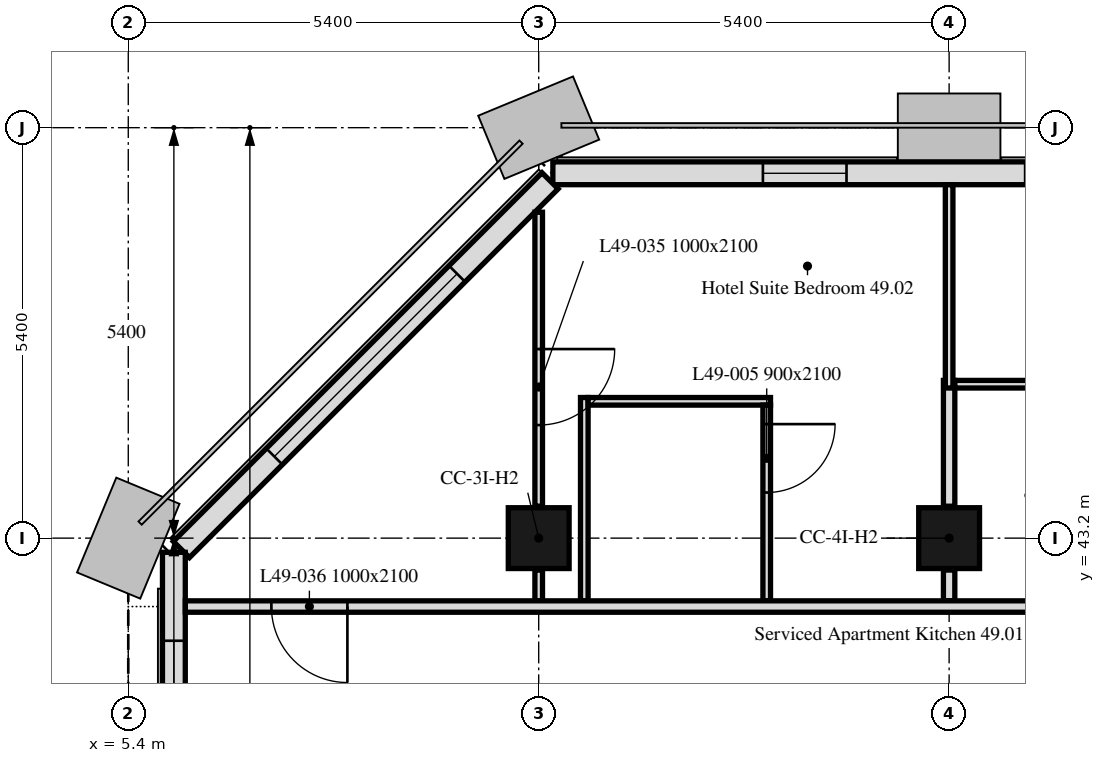
"""IFC4 building model, lengths in metres.
Left out: names, types, materials, properties, quantities, classifications, styles, units other than length and angle.
Written with IfcOpenShell. Run it as: python <this file> out.ifc"""

import sys

from ifc_helpers import new_model, si_unit, direction, frame, frame_2d, origin, origin_2d, place, context, subcontext, project, spatial, rectangle, extrude, element, fill, save


model = new_model("IFC4")
c1 = context("Model", 3, precision=1e-05, world=origin(), true_north=direction((0.0, 1.0)))
c2 = subcontext(c1, "Body", "Model", "MODEL_VIEW")
j1 = project(units=[si_unit("LENGTHUNIT", "METRE"), si_unit("PLANEANGLEUNIT", "RADIAN")], contexts=[c1])
p1 = place(None, origin())
s1 = spatial("IfcSite", under=j1, at=p1, CompositionType="ELEMENT")
p2 = place(p1, origin())
s2 = spatial("IfcBuilding", under=s1, at=p2, CompositionType="ELEMENT")
p3 = place(p2, frame((0.0, 0.0, 200.5)))
s3 = spatial("IfcBuildingStorey", under=s2, at=p3, CompositionType="ELEMENT", Elevation=200.5)
for number, where, z_axis, x_axis in (
    (1, (10.8, 43.2, 0.0), (0.0, 0.0, 1.0), (1.0, 0.0, 0.0)),
    (2, (16.2, 43.2, 0.0), (0.0, 0.0, 1.0), (1.0, 0.0, 0.0)),
):
    element("IfcColumn", number, at=place(p3, frame(where, z_axis=z_axis, x_axis=x_axis)), inside=s3, PredefinedType="COLUMN", context=c2, shape_type="SweptSolid", body=[
        extrude(rectangle(XDim=0.8, YDim=0.8, at=origin_2d()), origin(), (0.0, 0.0, 1.0), 3.0),
    ])
p4 = place(p3, frame((43.014, 48.0, 0.0), z_axis=(0.0, 0.0, 1.0), x_axis=(-1.0, 0.0, 0.0)))
e3 = element("IfcWall", 3, at=p4, inside=s3, PredefinedType="SOLIDWALL", context=c2, shape_type="SweptSolid", body=[
    extrude(rectangle(XDim=32.027, YDim=0.3, at=frame_2d((16.014, 0.0))), origin(), (0.0, 0.0, 1.0), 3.0),
])
p5 = place(p4, frame((0.814, 0.0, 0.9)))
e4 = element("IfcOpeningElement", 4, at=p5, cuts=e3, PredefinedType="OPENING", context=c2, shape_type="SweptSolid", body=[
    extrude(rectangle(XDim=3.4, YDim=1.7, at=frame_2d((1.7, 0.85))), frame((0.0, 0.16, 0.0), z_axis=(0.0, -1.0, 0.0), x_axis=(1.0, 0.0, 0.0)), (0.0, 0.0, 1.0), 0.32),
])
p6 = place(p4, frame((6.564, 0.0, 0.9)))
e5 = element("IfcOpeningElement", 5, at=p6, cuts=e3, PredefinedType="OPENING", context=c2, shape_type="SweptSolid", body=[
    extrude(rectangle(XDim=1.1, YDim=1.7, at=frame_2d((0.55, 0.85))), frame((0.0, 0.16, 0.0), z_axis=(0.0, -1.0, 0.0), x_axis=(1.0, 0.0, 0.0)), (0.0, 0.0, 1.0), 0.32),
])
p7 = place(p4, frame((11.614, 0.0, 0.9)))
e6 = element("IfcOpeningElement", 6, at=p7, cuts=e3, PredefinedType="OPENING", context=c2, shape_type="SweptSolid", body=[
    extrude(rectangle(XDim=3.4, YDim=1.7, at=frame_2d((1.7, 0.85))), frame((0.0, 0.16, 0.0), z_axis=(0.0, -1.0, 0.0), x_axis=(1.0, 0.0, 0.0)), (0.0, 0.0, 1.0), 0.32),
])
p8 = place(p4, frame((17.364, 0.0, 0.9)))
e7 = element("IfcOpeningElement", 7, at=p8, cuts=e3, PredefinedType="OPENING", context=c2, shape_type="SweptSolid", body=[
    extrude(rectangle(XDim=1.1, YDim=1.7, at=frame_2d((0.55, 0.85))), frame((0.0, 0.16, 0.0), z_axis=(0.0, -1.0, 0.0), x_axis=(1.0, 0.0, 0.0)), (0.0, 0.0, 1.0), 0.32),
])
p9 = place(p4, frame((22.414, 0.0, 0.9)))
e8 = element("IfcOpeningElement", 8, at=p9, cuts=e3, PredefinedType="OPENING", context=c2, shape_type="SweptSolid", body=[
    extrude(rectangle(XDim=3.4, YDim=1.7, at=frame_2d((1.7, 0.85))), frame((0.0, 0.16, 0.0), z_axis=(0.0, -1.0, 0.0), x_axis=(1.0, 0.0, 0.0)), (0.0, 0.0, 1.0), 0.32),
])
p10 = place(p4, frame((28.164, 0.0, 0.9)))
e9 = element("IfcOpeningElement", 9, at=p10, cuts=e3, PredefinedType="OPENING", context=c2, shape_type="SweptSolid", body=[
    extrude(rectangle(XDim=1.1, YDim=1.7, at=frame_2d((0.55, 0.85))), frame((0.0, 0.16, 0.0), z_axis=(0.0, -1.0, 0.0), x_axis=(1.0, 0.0, 0.0)), (0.0, 0.0, 1.0), 0.32),
])
p11 = place(p3, frame((10.949, 47.901, 0.0), z_axis=(0.0, 0.0, 1.0), x_axis=(-0.707106781187, -0.707106781187, 0.0)))
e10 = element("IfcWall", 10, at=p11, inside=s3, PredefinedType="SOLIDWALL", context=c2, shape_type="SweptSolid", body=[
    extrude(rectangle(XDim=6.86, YDim=0.3, at=frame_2d((3.43, 0.0))), origin(), (0.0, 0.0, 1.0), 3.0),
])
p12 = place(p11, frame((1.73, 0.0, 0.9)))
e11 = element("IfcOpeningElement", 11, at=p12, cuts=e10, PredefinedType="OPENING", context=c2, shape_type="SweptSolid", body=[
    extrude(rectangle(XDim=3.4, YDim=1.7, at=frame_2d((1.7, 0.85))), frame((0.0, 0.16, 0.0), z_axis=(0.0, -1.0, 0.0), x_axis=(1.0, 0.0, 0.0)), (0.0, 0.0, 1.0), 0.32),
])
p13 = place(p3, frame((6.0, 43.014, 0.0), z_axis=(0.0, 0.0, 1.0), x_axis=(0.0, -1.0, 0.0)))
e12 = element("IfcWall", 12, at=p13, inside=s3, PredefinedType="SOLIDWALL", context=c2, shape_type="SweptSolid", body=[
    extrude(rectangle(XDim=10.614, YDim=0.3, at=frame_2d((5.307, 0.0))), origin(), (0.0, 0.0, 1.0), 3.0),
])
p14 = place(p13, frame((1.164, 0.0, 0.9)))
e13 = element("IfcOpeningElement", 13, at=p14, cuts=e12, PredefinedType="OPENING", context=c2, shape_type="SweptSolid", body=[
    extrude(rectangle(XDim=1.1, YDim=1.7, at=frame_2d((0.55, 0.85))), frame((0.0, 0.16, 0.0), z_axis=(0.0, -1.0, 0.0), x_axis=(1.0, 0.0, 0.0)), (0.0, 0.0, 1.0), 0.32),
])
p15 = place(p13, frame((2.764, 0.0, 0.9)))
e14 = element("IfcOpeningElement", 14, at=p15, cuts=e12, PredefinedType="OPENING", context=c2, shape_type="SweptSolid", body=[
    extrude(rectangle(XDim=1.1, YDim=1.7, at=frame_2d((0.55, 0.85))), frame((0.0, 0.16, 0.0), z_axis=(0.0, -1.0, 0.0), x_axis=(1.0, 0.0, 0.0)), (0.0, 0.0, 1.0), 0.32),
])
p16 = place(p13, frame((6.564, 0.0, 0.9)))
e15 = element("IfcOpeningElement", 15, at=p16, cuts=e12, PredefinedType="OPENING", context=c2, shape_type="SweptSolid", body=[
    extrude(rectangle(XDim=1.1, YDim=1.7, at=frame_2d((0.55, 0.85))), frame((0.0, 0.16, 0.0), z_axis=(0.0, -1.0, 0.0), x_axis=(1.0, 0.0, 0.0)), (0.0, 0.0, 1.0), 0.32),
])
p17 = place(p13, frame((8.164, 0.0, 0.9)))
e16 = element("IfcOpeningElement", 16, at=p17, cuts=e12, PredefinedType="OPENING", context=c2, shape_type="SweptSolid", body=[
    extrude(rectangle(XDim=1.1, YDim=1.7, at=frame_2d((0.55, 0.85))), frame((0.0, 0.16, 0.0), z_axis=(0.0, -1.0, 0.0), x_axis=(1.0, 0.0, 0.0)), (0.0, 0.0, 1.0), 0.32),
])
p18 = place(p3, frame((10.8, 47.488, 0.0), z_axis=(0.0, 0.0, 1.0), x_axis=(0.0, -1.0, 0.0)))
e17 = element("IfcWall", 17, at=p18, inside=s3, PredefinedType="PARTITIONING", context=c2, shape_type="SweptSolid", body=[
    extrude(rectangle(XDim=3.868, YDim=0.1, at=frame_2d((1.934, 0.0))), origin(), (0.0, 0.0, 1.0), 3.0),
])
p19 = place(p18, frame((1.8, 0.0, 0.0)))
e18 = element("IfcOpeningElement", 18, at=p19, cuts=e17, PredefinedType="OPENING", context=c2, shape_type="SweptSolid", body=[
    extrude(rectangle(XDim=1.0, YDim=2.1, at=frame_2d((0.5, 1.05))), frame((0.0, 0.05, 0.0), z_axis=(0.0, -1.0, 0.0), x_axis=(1.0, 0.0, 0.0)), (0.0, 0.0, 1.0), 0.1),
])
p20 = place(p3, frame((10.8, 42.78, 0.0), z_axis=(0.0, 0.0, 1.0), x_axis=(0.0, -1.0, 0.0)))
e19 = element("IfcWall", 19, at=p20, inside=s3, PredefinedType="PARTITIONING", context=c2, shape_type="SweptSolid", body=[
    extrude(rectangle(XDim=0.405, YDim=0.1, at=frame_2d((0.203, 0.0))), origin(), (0.0, 0.0, 1.0), 3.0),
])
p21 = place(p3, frame((11.4, 42.375, 0.0), z_axis=(0.0, 0.0, 1.0), x_axis=(0.0, 1.0, 0.0)))
e20 = element("IfcWall", 20, at=p21, inside=s3, PredefinedType="PARTITIONING", context=c2, shape_type="SweptSolid", body=[
    extrude(rectangle(XDim=2.675, YDim=0.1, at=frame_2d((1.337, 0.0))), origin(), (0.0, 0.0, 1.0), 3.0),
])
p22 = place(p3, frame((11.45, 45.0, 0.0), z_axis=(0.0, 0.0, 1.0), x_axis=(1.0, 0.0, 0.0)))
e21 = element("IfcWall", 21, at=p22, inside=s3, PredefinedType="PARTITIONING", context=c2, shape_type="SweptSolid", body=[
    extrude(rectangle(XDim=2.4, YDim=0.1, at=frame_2d((1.2, 0.0))), origin(), (0.0, 0.0, 1.0), 3.0),
])
p23 = place(p3, frame((13.8, 44.95, 0.0), z_axis=(0.0, 0.0, 1.0), x_axis=(0.0, -1.0, 0.0)))
e22 = element("IfcWall", 22, at=p23, inside=s3, PredefinedType="PARTITIONING", context=c2, shape_type="SweptSolid", body=[
    extrude(rectangle(XDim=2.575, YDim=0.1, at=frame_2d((1.288, 0.0))), origin(), (0.0, 0.0, 1.0), 3.0),
])
p24 = place(p23, frame((0.25, 0.0, 0.0)))
e23 = element("IfcOpeningElement", 23, at=p24, cuts=e22, PredefinedType="OPENING", context=c2, shape_type="SweptSolid", body=[
    extrude(rectangle(XDim=0.9, YDim=2.1, at=frame_2d((0.45, 1.05))), frame((0.0, 0.05, 0.0), z_axis=(0.0, -1.0, 0.0), x_axis=(1.0, 0.0, 0.0)), (0.0, 0.0, 1.0), 0.1),
])
p25 = place(p3, frame((16.2, 42.375, 0.0), z_axis=(0.0, 0.0, 1.0), x_axis=(0.0, 1.0, 0.0)))
e24 = element("IfcWall", 24, at=p25, inside=s3, PredefinedType="PARTITIONING", context=c2, shape_type="SweptSolid", body=[
    extrude(rectangle(XDim=0.405, YDim=0.15, at=frame_2d((0.203, 0.0))), origin(), (0.0, 0.0, 1.0), 2.4),
])
p26 = place(p3, frame((16.2, 43.62, 0.0), z_axis=(0.0, 0.0, 1.0), x_axis=(0.0, 1.0, 0.0)))
e25 = element("IfcWall", 25, at=p26, inside=s3, PredefinedType="PARTITIONING", context=c2, shape_type="SweptSolid", body=[
    extrude(rectangle(XDim=1.655, YDim=0.15, at=frame_2d((0.827, 0.0))), origin(), (0.0, 0.0, 1.0), 2.4),
])
p27 = place(p3, frame((16.2, 45.175, 0.0), z_axis=(0.0, 0.0, 1.0), x_axis=(0.0, 1.0, 0.0)))
e26 = element("IfcWall", 26, at=p27, inside=s3, PredefinedType="PARTITIONING", context=c2, shape_type="SweptSolid", body=[
    extrude(rectangle(XDim=2.674, YDim=0.1, at=frame_2d((1.337, 0.0))), origin(), (0.0, 0.0, 1.0), 2.4),
])
p28 = place(p3, frame((18.25, 45.225, 0.0), z_axis=(0.0, 0.0, 1.0), x_axis=(-1.0, 0.0, 0.0)))
e27 = element("IfcWall", 27, at=p28, inside=s3, PredefinedType="PARTITIONING", context=c2, shape_type="SweptSolid", body=[
    extrude(rectangle(XDim=1.975, YDim=0.1, at=frame_2d((0.988, 0.0))), origin(), (0.0, 0.0, 1.0), 3.0),
])
p29 = place(p3, frame((47.849, 42.3, 0.0), z_axis=(0.0, 0.0, 1.0), x_axis=(-1.0, 0.0, 0.0)))
e28 = element("IfcWall", 28, at=p29, inside=s3, PredefinedType="PARTITIONING", context=c2, shape_type="SweptSolid", body=[
    extrude(rectangle(XDim=41.698, YDim=0.15, at=frame_2d((20.849, 0.0))), origin(), (0.0, 0.0, 1.0), 2.4),
])
p30 = place(p29, frame((39.566, 0.0, 0.0)))
e29 = element("IfcOpeningElement", 29, at=p30, cuts=e28, PredefinedType="OPENING", context=c2, shape_type="SweptSolid", body=[
    extrude(rectangle(XDim=1.0, YDim=2.1, at=frame_2d((0.5, 1.05))), frame((0.0, 0.075, 0.0), z_axis=(0.0, -1.0, 0.0), x_axis=(1.0, 0.0, 0.0)), (0.0, 0.0, 1.0), 0.15),
])
p31 = place(p29, frame((3.099, 0.0, 0.0)))
e30 = element("IfcOpeningElement", 30, at=p31, cuts=e28, PredefinedType="OPENING", context=c2, shape_type="SweptSolid", body=[
    extrude(rectangle(XDim=1.0, YDim=2.1, at=frame_2d((0.5, 1.05))), frame((0.0, 0.075, 0.0), z_axis=(0.0, -1.0, 0.0), x_axis=(1.0, 0.0, 0.0)), (0.0, 0.0, 1.0), 0.15),
])
p32 = place(p29, frame((28.249, 0.0, 0.0)))
e31 = element("IfcOpeningElement", 31, at=p32, cuts=e28, PredefinedType="OPENING", context=c2, shape_type="SweptSolid", body=[
    extrude(rectangle(XDim=1.0, YDim=2.1, at=frame_2d((0.5, 1.05))), frame((0.0, 0.075, 0.0), z_axis=(0.0, -1.0, 0.0), x_axis=(1.0, 0.0, 0.0)), (0.0, 0.0, 1.0), 0.15),
])
p33 = place(p29, frame((17.449, 0.0, 0.0)))
e32 = element("IfcOpeningElement", 32, at=p33, cuts=e28, PredefinedType="OPENING", context=c2, shape_type="SweptSolid", body=[
    extrude(rectangle(XDim=1.0, YDim=2.1, at=frame_2d((0.5, 1.05))), frame((0.0, 0.075, 0.0), z_axis=(0.0, -1.0, 0.0), x_axis=(1.0, 0.0, 0.0)), (0.0, 0.0, 1.0), 0.15),
])
p34 = place(p10, origin())
e33 = element("IfcWindow", 33, at=p34, inside=s3, PartitioningType="SINGLE_PANEL", PredefinedType="WINDOW", context=c2, shape_type="SweptSolid", body=[
    extrude(rectangle(XDim=1.1, YDim=1.7, at=frame_2d((0.55, 0.85))), frame((0.0, 0.03, 0.0), z_axis=(0.0, -1.0, 0.0), x_axis=(1.0, 0.0, 0.0)), (0.0, 0.0, 1.0), 0.06),
])
fill(e9, e33)
p35 = place(p12, origin())
e34 = element("IfcWindow", 34, at=p35, inside=s3, PartitioningType="SINGLE_PANEL", PredefinedType="WINDOW", context=c2, shape_type="SweptSolid", body=[
    extrude(rectangle(XDim=3.4, YDim=1.7, at=frame_2d((1.7, 0.85))), frame((0.0, 0.03, 0.0), z_axis=(0.0, -1.0, 0.0), x_axis=(1.0, 0.0, 0.0)), (0.0, 0.0, 1.0), 0.06),
])
fill(e11, e34)
p36 = place(p14, origin())
e35 = element("IfcWindow", 35, at=p36, inside=s3, PartitioningType="SINGLE_PANEL", PredefinedType="WINDOW", context=c2, shape_type="SweptSolid", body=[
    extrude(rectangle(XDim=1.1, YDim=1.7, at=frame_2d((0.55, 0.85))), frame((0.0, 0.03, 0.0), z_axis=(0.0, -1.0, 0.0), x_axis=(1.0, 0.0, 0.0)), (0.0, 0.0, 1.0), 0.06),
])
fill(e13, e35)
p37 = place(p24, origin())
e36 = element("IfcDoor", 36, at=p37, inside=s3, OperationType="SINGLE_SWING_LEFT", PredefinedType="DOOR", context=c2, shape_type="SweptSolid", body=[
    extrude(rectangle(XDim=0.9, YDim=2.1, at=frame_2d((0.45, 1.05))), frame((0.0, 0.025, 0.0), z_axis=(0.0, -1.0, 0.0), x_axis=(1.0, 0.0, 0.0)), (0.0, 0.0, 1.0), 0.05),
])
fill(e23, e36)
p38 = place(p19, origin())
e37 = element("IfcDoor", 37, at=p38, inside=s3, OperationType="SINGLE_SWING_LEFT", PredefinedType="DOOR", context=c2, shape_type="SweptSolid", body=[
    extrude(rectangle(XDim=1.0, YDim=2.1, at=frame_2d((0.5, 1.05))), frame((0.0, 0.025, 0.0), z_axis=(0.0, -1.0, 0.0), x_axis=(1.0, 0.0, 0.0)), (0.0, 0.0, 1.0), 0.05),
])
fill(e18, e37)
p39 = place(p30, origin())
e38 = element("IfcDoor", 38, at=p39, inside=s3, OperationType="SINGLE_SWING_RIGHT", PredefinedType="DOOR", context=c2, shape_type="SweptSolid", body=[
    extrude(rectangle(XDim=1.0, YDim=2.1, at=frame_2d((0.5, 1.05))), frame((0.0, 0.025, 0.0), z_axis=(0.0, -1.0, 0.0), x_axis=(1.0, 0.0, 0.0)), (0.0, 0.0, 1.0), 0.05),
])
fill(e29, e38)
save(model, sys.argv[1])
